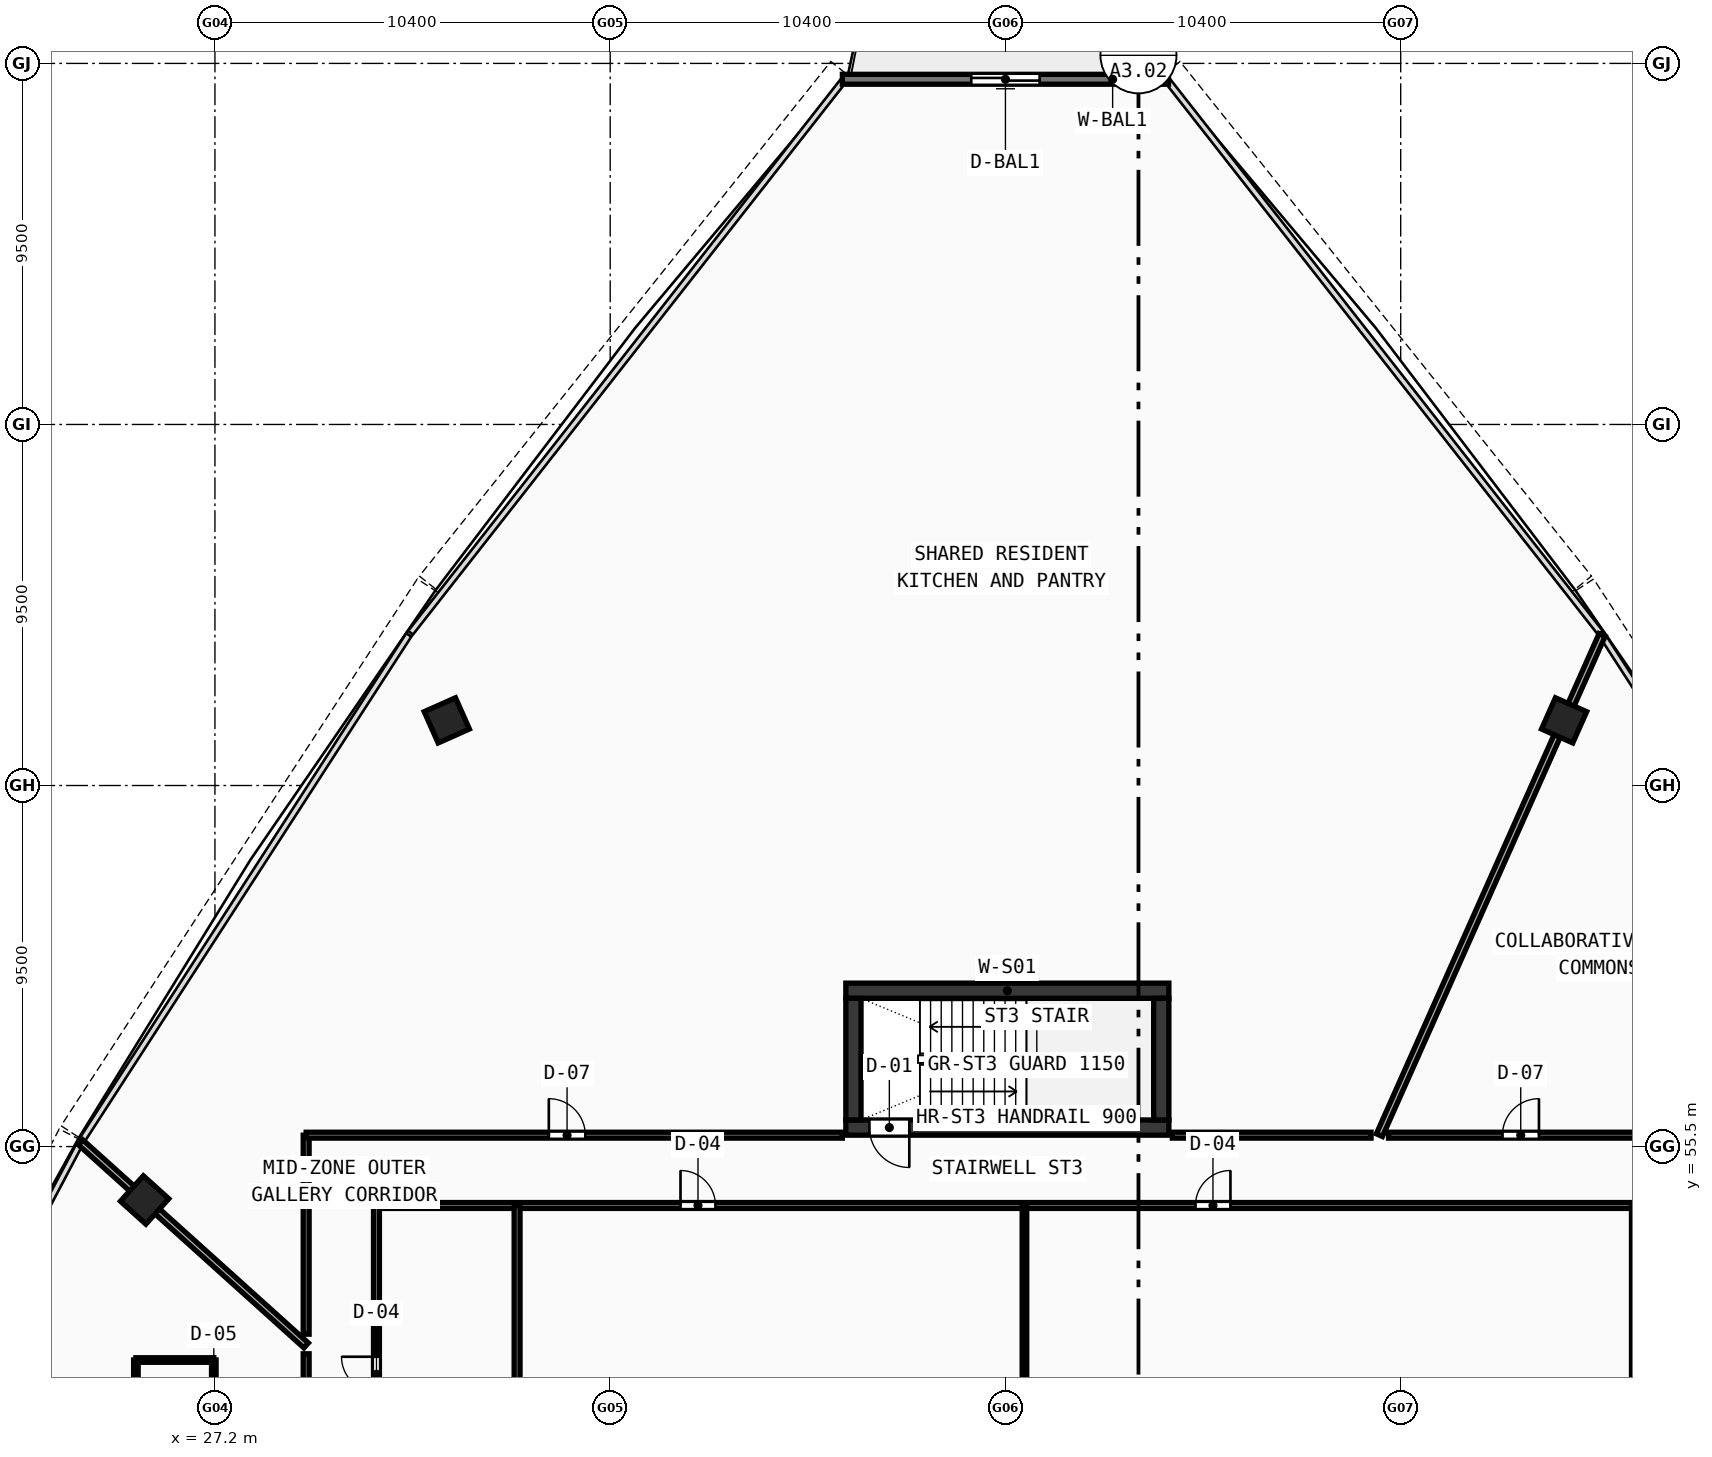
"""IFC4 building model, lengths in metres.
Left out: names, types, materials, properties, quantities, classifications, styles, units other than length and angle.
Written with IfcOpenShell. Run it as: python <this file> out.ifc"""

import sys

from ifc_helpers import new_model, si_unit, direction, frame, frame_2d, origin, origin_with_axes, origin_2d, place, context, subcontext, project, spatial, rectangle, hollow_rectangle, extrude, source, transform, mapped, element, fill, save


model = new_model("IFC4")
c1 = context("Model", 3, precision=1e-05, world=origin(), true_north=direction((0.0, 1.0)))
c2 = subcontext(c1, "Body", "Model", "MODEL_VIEW")
j1 = project(units=[si_unit("LENGTHUNIT", "METRE"), si_unit("PLANEANGLEUNIT", "RADIAN")], contexts=[c1])
p1 = place(None, origin())
s1 = spatial("IfcSite", under=j1, at=p1, CompositionType="ELEMENT")
p2 = place(p1, origin())
s2 = spatial("IfcBuilding", under=s1, at=p2, CompositionType="ELEMENT")
p3 = place(p2, frame((0.0, 0.0, 188.56)))
s3 = spatial("IfcBuildingStorey", under=s2, at=p3, CompositionType="ELEMENT", Elevation=188.56)
p4 = place(p3, frame((43.8, 59.6, 0.0), z_axis=(0.0, 0.0, 1.0), x_axis=(1.0, 0.0, 0.0)))
e1 = element("IfcWall", 1, at=p4, inside=s3, PredefinedType="SHEAR", context=c2, shape_type="SweptSolid", body=[
    extrude(rectangle(XDim=8.5, YDim=0.4, at=frame_2d((4.25, 0.0))), origin(), (0.0, 0.0, 1.0), 3.54),
])
p5 = place(p3, frame((43.8, 56.0, 0.0), z_axis=(0.0, 0.0, 1.0), x_axis=(1.0, 0.0, 0.0)))
e2 = element("IfcWall", 2, at=p5, inside=s3, PredefinedType="SHEAR", context=c2, shape_type="SweptSolid", body=[
    extrude(rectangle(XDim=8.5, YDim=0.4, at=frame_2d((4.25, 0.0))), origin(), (0.0, 0.0, 1.0), 3.54),
])
p6 = place(p5, frame((0.62, 0.0, 0.0)))
e3 = element("IfcOpeningElement", 3, at=p6, cuts=e2, PredefinedType="OPENING", context=c2, shape_type="SweptSolid", body=[
    extrude(rectangle(XDim=1.05, YDim=2.1, at=frame_2d((0.525, 1.05))), frame((0.0, 0.21, 0.0), z_axis=(0.0, -1.0, 0.0), x_axis=(1.0, 0.0, 0.0)), (0.0, 0.0, 1.0), 0.42),
])
for number, where, z_axis, x_axis in (
    (4, (44.0, 56.2, 0.0), (0.0, 0.0, 1.0), (0.0, 1.0, 0.0)),
    (5, (52.1, 56.2, 0.0), (0.0, 0.0, 1.0), (0.0, 1.0, 0.0)),
):
    element("IfcWall", number, at=place(p3, frame(where, z_axis=z_axis, x_axis=x_axis)), inside=s3, PredefinedType="SHEAR", context=c2, shape_type="SweptSolid", body=[
        extrude(rectangle(XDim=3.2, YDim=0.4, at=frame_2d((1.6, 0.0))), origin(), (0.0, 0.0, 1.0), 3.54),
    ])
m1 = source(origin(), c2, "Body", "SweptSolid", [
    extrude(hollow_rectangle(XDim=0.9, YDim=0.9, WallThickness=0.036, at=origin_2d()), origin(), (0.0, 0.0, 1.0), 3.8),
])
for number, where, z_axis, x_axis in (
    (6, (62.699, 66.715, -0.26), (0.0, 0.0, 1.0), (-0.914, 0.407, 0.0)),
    (7, (33.301, 66.715, -0.26), (0.0, 0.0, 1.0), (-0.914, -0.407, 0.0)),
    (8, (25.349, 54.095, -0.26), (0.0, 0.0, 1.0), (-0.669, -0.743, 0.0)),
):
    element("IfcColumn", number, at=place(p3, frame(where, z_axis=z_axis, x_axis=x_axis)), inside=s3, PredefinedType="COLUMN", context=c2, shape_type="MappedRepresentation", body=[
        mapped(m1, transform((0.0, 0.0, 0.0), scale=1.0)),
    ])
p7 = place(p3, frame((52.29, 83.583, 0.0), z_axis=(0.0, 0.0, 1.0), x_axis=(-1.0, 0.0, 0.0)))
e9 = element("IfcWall", 9, at=p7, inside=s3, PredefinedType="STANDARD", context=c2, shape_type="SweptSolid", body=[
    extrude(rectangle(XDim=8.581, YDim=0.26, at=frame_2d((4.29, 0.0))), origin(), (0.0, 0.0, 1.0), 3.54),
])
p8 = place(p7, frame((3.39, 0.0, 0.0)))
e10 = element("IfcOpeningElement", 10, at=p8, cuts=e9, PredefinedType="OPENING", context=c2, shape_type="SweptSolid", body=[
    extrude(rectangle(XDim=1.8, YDim=2.15, at=frame_2d((0.9, 1.075))), frame((0.0, 0.14, 0.0), z_axis=(0.0, -1.0, 0.0), x_axis=(1.0, 0.0, 0.0)), (0.0, 0.0, 1.0), 0.28),
])
p9 = place(p3, frame((31.45, 53.95, 0.0), z_axis=(0.0, 0.0, 1.0), x_axis=(1.0, 0.0, 0.0)))
e11 = element("IfcWall", 11, at=p9, inside=s3, PredefinedType="PARTITIONING", context=c2, shape_type="SweptSolid", body=[
    extrude(rectangle(XDim=33.1, YDim=0.155, at=frame_2d((16.55, 0.0))), origin(), (0.0, 0.0, 1.0), 2.89),
])
p10 = place(p9, frame((8.0, 0.0, 0.0)))
e12 = element("IfcOpeningElement", 12, at=p10, cuts=e11, PredefinedType="OPENING", context=c2, shape_type="SweptSolid", body=[
    extrude(rectangle(XDim=0.92, YDim=2.1, at=frame_2d((0.46, 1.05))), frame((0.0, 0.087, 0.0), z_axis=(0.0, -1.0, 0.0), x_axis=(1.0, 0.0, 0.0)), (0.0, 0.0, 1.0), 0.175),
])
p11 = place(p9, frame((21.55, 0.0, 0.0)))
e13 = element("IfcOpeningElement", 13, at=p11, cuts=e11, PredefinedType="OPENING", context=c2, shape_type="SweptSolid", body=[
    extrude(rectangle(XDim=0.92, YDim=2.1, at=frame_2d((0.46, 1.05))), frame((0.0, 0.087, 0.0), z_axis=(0.0, -1.0, 0.0), x_axis=(1.0, 0.0, 0.0)), (0.0, 0.0, 1.0), 0.175),
])
p12 = place(p3, frame((31.45, 42.25, 0.0), z_axis=(0.0, 0.0, 1.0), x_axis=(0.0, 1.0, 0.0)))
e14 = element("IfcWall", 14, at=p12, inside=s3, PredefinedType="PARTITIONING", context=c2, shape_type="SweptSolid", body=[
    extrude(rectangle(XDim=11.7, YDim=0.155, at=frame_2d((5.85, 0.0))), origin(), (0.0, 0.0, 1.0), 2.89),
])
p13 = place(p12, frame((1.4, 0.0, 0.0)))
e15 = element("IfcOpeningElement", 15, at=p13, cuts=e14, PredefinedType="OPENING", context=c2, shape_type="SweptSolid", body=[
    extrude(rectangle(XDim=0.94, YDim=2.1, at=frame_2d((0.47, 1.05))), frame((0.0, 0.087, 0.0), z_axis=(0.0, -1.0, 0.0), x_axis=(1.0, 0.0, 0.0)), (0.0, 0.0, 1.0), 0.175),
])
p14 = place(p12, frame((6.8, 0.0, 0.0)))
e16 = element("IfcOpeningElement", 16, at=p14, cuts=e14, PredefinedType="OPENING", context=c2, shape_type="SweptSolid", body=[
    extrude(rectangle(XDim=0.92, YDim=2.1, at=frame_2d((0.46, 1.05))), frame((0.0, 0.087, 0.0), z_axis=(0.0, -1.0, 0.0), x_axis=(1.0, 0.0, 0.0)), (0.0, 0.0, 1.0), 0.175),
])
for number, where, z_axis, x_axis in (
    (17, (64.55, 42.25, 0.0), (0.0, 0.0, 1.0), (0.0, 1.0, 0.0)),
    (18, (35.15, 42.25, 0.0), (0.0, 0.0, 1.0), (0.0, 1.0, 0.0)),
):
    element("IfcWall", number, at=place(p3, frame(where, z_axis=z_axis, x_axis=x_axis)), inside=s3, PredefinedType="PARTITIONING", context=c2, shape_type="SweptSolid", body=[
        extrude(rectangle(XDim=11.7, YDim=0.155, at=frame_2d((5.85, 0.0))), origin(), (0.0, 0.0, 1.0), 2.89),
    ])
p15 = place(p3, frame((48.5, 42.25, 0.0), z_axis=(0.0, 0.0, 1.0), x_axis=(0.0, 1.0, 0.0)))
e19 = element("IfcWall", 19, at=p15, inside=s3, PredefinedType="PARTITIONING", context=c2, shape_type="SweptSolid", body=[
    extrude(rectangle(XDim=11.7, YDim=0.12, at=frame_2d((5.85, 0.0))), origin(), (0.0, 0.0, 1.0), 3.14),
])
p16 = place(p3, frame((57.84, 55.8, 0.0), z_axis=(0.0, 0.0, 1.0), x_axis=(0.40674529891, 0.913541603768, 0.0)))
e20 = element("IfcWall", 20, at=p16, inside=s3, PredefinedType="PARTITIONING", context=c2, shape_type="SweptSolid", body=[
    extrude(rectangle(XDim=14.407, YDim=0.175, at=frame_2d((7.203, 0.0))), origin(), (0.0, 0.0, 1.0), 2.89),
])
p17 = place(p3, frame((29.6, 50.267, 0.0), z_axis=(0.0, 0.0, 1.0), x_axis=(-0.743139097079, 0.669136968335, 0.0)))
e21 = element("IfcWall", 21, at=p17, inside=s3, PredefinedType="PARTITIONING", context=c2, shape_type="SweptSolid", body=[
    extrude(rectangle(XDim=7.987, YDim=0.175, at=frame_2d((3.994, 0.0))), origin(), (0.0, 0.0, 1.0), 2.89),
])
p18 = place(p3, frame((29.6, 43.733, 0.0), z_axis=(0.0, 0.0, 1.0), x_axis=(0.0, 1.0, 0.0)))
e22 = element("IfcWall", 22, at=p18, inside=s3, PredefinedType="PARTITIONING", context=c2, shape_type="SweptSolid", body=[
    extrude(rectangle(XDim=6.315, YDim=0.155, at=frame_2d((3.157, 0.0))), origin(), (0.0, 0.0, 1.0), 2.89),
])
p19 = place(p18, frame((2.668, 0.0, 0.0)))
e23 = element("IfcOpeningElement", 23, at=p19, cuts=e22, PredefinedType="OPENING", context=c2, shape_type="SweptSolid", body=[
    extrude(rectangle(XDim=0.96, YDim=2.12, at=frame_2d((0.48, 1.06))), frame((0.0, 0.087, 0.0), z_axis=(0.0, -1.0, 0.0), x_axis=(1.0, 0.0, 0.0)), (0.0, 0.0, 1.0), 0.175),
])
p20 = place(p3, frame((29.6, 50.563, 0.0), z_axis=(0.0, 0.0, 1.0), x_axis=(0.0, 1.0, 0.0)))
e24 = element("IfcWall", 24, at=p20, inside=s3, PredefinedType="PARTITIONING", context=c2, shape_type="SweptSolid", body=[
    extrude(rectangle(XDim=5.237, YDim=0.155, at=frame_2d((2.618, 0.0))), origin(), (0.0, 0.0, 1.0), 3.54),
])
p21 = place(p3, frame((29.6, 55.8, 0.0), z_axis=(0.0, 0.0, 1.0), x_axis=(1.0, 0.0, 0.0)))
e25 = element("IfcWall", 25, at=p21, inside=s3, PredefinedType="PARTITIONING", context=c2, shape_type="SweptSolid", body=[
    extrude(rectangle(XDim=14.109, YDim=0.155, at=frame_2d((7.054, 0.0))), origin(), (0.0, 0.0, 1.0), 2.89),
])
p22 = place(p21, frame((6.385, 0.0, 0.0)))
e26 = element("IfcOpeningElement", 26, at=p22, cuts=e25, PredefinedType="OPENING", context=c2, shape_type="SweptSolid", body=[
    extrude(rectangle(XDim=0.96, YDim=2.12, at=frame_2d((0.48, 1.06))), frame((0.0, 0.087, 0.0), z_axis=(0.0, -1.0, 0.0), x_axis=(1.0, 0.0, 0.0)), (0.0, 0.0, 1.0), 0.175),
])
p23 = place(p3, frame((52.391, 55.8, 0.0), z_axis=(0.0, 0.0, 1.0), x_axis=(1.0, 0.0, 0.0)))
e27 = element("IfcWall", 27, at=p23, inside=s3, PredefinedType="PARTITIONING", context=c2, shape_type="SweptSolid", body=[
    extrude(rectangle(XDim=5.229, YDim=0.155, at=frame_2d((2.614, 0.0))), origin(), (0.0, 0.0, 1.0), 2.89),
])
p24 = place(p3, frame((58.08, 55.8, 0.0), z_axis=(0.0, 0.0, 1.0), x_axis=(1.0, 0.0, 0.0)))
e28 = element("IfcWall", 28, at=p24, inside=s3, PredefinedType="PARTITIONING", context=c2, shape_type="SweptSolid", body=[
    extrude(rectangle(XDim=6.966, YDim=0.155, at=frame_2d((3.483, 0.0))), origin(), (0.0, 0.0, 1.0), 3.14),
])
p25 = place(p24, frame((2.998, 0.0, 0.0)))
e29 = element("IfcOpeningElement", 29, at=p25, cuts=e28, PredefinedType="OPENING", context=c2, shape_type="SweptSolid", body=[
    extrude(rectangle(XDim=0.96, YDim=2.12, at=frame_2d((0.48, 1.06))), frame((0.0, 0.087, 0.0), z_axis=(0.0, -1.0, 0.0), x_axis=(1.0, 0.0, 0.0)), (0.0, 0.0, 1.0), 0.175),
])
p26 = place(p3, frame((27.17, 47.984, 0.0), z_axis=(0.0, 0.0, 1.0), x_axis=(0.0, 1.0, 0.0)))
e30 = element("IfcWall", 30, at=p26, inside=s3, PredefinedType="PARTITIONING", context=c2, shape_type="SweptSolid", body=[
    extrude(rectangle(XDim=1.9, YDim=0.12, at=frame_2d((0.95, 0.0))), origin(), (0.0, 0.0, 1.0), 3.54),
])
p27 = place(p26, frame((0.525, 0.0, 0.0)))
e31 = element("IfcOpeningElement", 31, at=p27, cuts=e30, PredefinedType="OPENING", context=c2, shape_type="SweptSolid", body=[
    extrude(rectangle(XDim=0.85, YDim=2.1, at=frame_2d((0.425, 1.05))), frame((0.0, 0.07, 0.0), z_axis=(0.0, -1.0, 0.0), x_axis=(1.0, 0.0, 0.0)), (0.0, 0.0, 1.0), 0.14),
])
p28 = place(p3, frame((27.17, 49.884, 0.0), z_axis=(0.0, 0.0, 1.0), x_axis=(-1.0, 0.0, 0.0)))
e32 = element("IfcWall", 32, at=p28, inside=s3, PredefinedType="PARTITIONING", context=c2, shape_type="SweptSolid", body=[
    extrude(rectangle(XDim=2.05, YDim=0.12, at=frame_2d((1.025, 0.0))), origin(), (0.0, 0.0, 1.0), 3.54),
])
p29 = place(p3, frame((25.12, 49.884, 0.0), z_axis=(0.0, 0.0, 1.0), x_axis=(0.0, -1.0, 0.0)))
e33 = element("IfcWall", 33, at=p29, inside=s3, PredefinedType="PARTITIONING", context=c2, shape_type="SweptSolid", body=[
    extrude(rectangle(XDim=1.9, YDim=0.12, at=frame_2d((0.95, 0.0))), origin(), (0.0, 0.0, 1.0), 3.54),
])
m2 = source(origin(), c2, "Body", "SweptSolid", [
    extrude(rectangle(XDim=1.8, YDim=2.15, at=frame_2d((0.9, 1.075))), frame((0.0, 0.025, 0.0), z_axis=(0.0, -1.0, 0.0), x_axis=(1.0, 0.0, 0.0)), (0.0, 0.0, 1.0), 0.05),
])
p30 = place(p8, origin_with_axes())
e34 = element("IfcDoor", 34, at=p30, inside=s3, OperationType="DOUBLE_DOOR_SLIDING", PredefinedType="DOOR", context=c2, shape_type="MappedRepresentation", body=[
    mapped(m2, transform((0.0, 0.0, 0.0), scale=1.0)),
])
fill(e10, e34)
m3 = source(origin(), c2, "Body", "SweptSolid", [
    extrude(rectangle(XDim=1.05, YDim=2.1, at=frame_2d((0.525, 1.05))), frame((0.0, 0.025, 0.0), z_axis=(0.0, -1.0, 0.0), x_axis=(1.0, 0.0, 0.0)), (0.0, 0.0, 1.0), 0.05),
])
p31 = place(p6, frame((1.05, 0.0, 0.0), z_axis=(0.0, 0.0, 1.0), x_axis=(-1.0, 0.0, 0.0)))
e35 = element("IfcDoor", 35, at=p31, inside=s3, OperationType="SINGLE_SWING_LEFT", PredefinedType="DOOR", context=c2, shape_type="MappedRepresentation", body=[
    mapped(m3, transform((0.0, 0.0, 0.0), scale=1.0)),
])
fill(e3, e35)
m4 = source(origin(), c2, "Body", "SweptSolid", [
    extrude(rectangle(XDim=0.92, YDim=2.1, at=frame_2d((0.46, 1.05))), frame((0.0, 0.025, 0.0), z_axis=(0.0, -1.0, 0.0), x_axis=(1.0, 0.0, 0.0)), (0.0, 0.0, 1.0), 0.05),
])
p32 = place(p14, origin_with_axes())
e36 = element("IfcDoor", 36, at=p32, inside=s3, OperationType="SINGLE_SWING_RIGHT", PredefinedType="DOOR", context=c2, shape_type="MappedRepresentation", body=[
    mapped(m4, transform((0.0, 0.0, 0.0), scale=1.0)),
])
fill(e16, e36)
p33 = place(p10, origin_with_axes())
e37 = element("IfcDoor", 37, at=p33, inside=s3, OperationType="SINGLE_SWING_LEFT", PredefinedType="DOOR", context=c2, shape_type="MappedRepresentation", body=[
    mapped(m4, transform((0.0, 0.0, 0.0), scale=1.0)),
])
fill(e12, e37)
p34 = place(p11, origin_with_axes())
e38 = element("IfcDoor", 38, at=p34, inside=s3, OperationType="SINGLE_SWING_RIGHT", PredefinedType="DOOR", context=c2, shape_type="MappedRepresentation", body=[
    mapped(m4, transform((0.0, 0.0, 0.0), scale=1.0)),
])
fill(e13, e38)
m5 = source(origin(), c2, "Body", "SweptSolid", [
    extrude(rectangle(XDim=0.96, YDim=2.12, at=frame_2d((0.48, 1.06))), frame((0.0, 0.025, 0.0), z_axis=(0.0, -1.0, 0.0), x_axis=(1.0, 0.0, 0.0)), (0.0, 0.0, 1.0), 0.05),
])
p35 = place(p25, origin_with_axes())
e39 = element("IfcDoor", 39, at=p35, inside=s3, OperationType="SINGLE_SWING_RIGHT", PredefinedType="DOOR", context=c2, shape_type="MappedRepresentation", body=[
    mapped(m5, transform((0.0, 0.0, 0.0), scale=1.0)),
])
fill(e29, e39)
p36 = place(p22, origin_with_axes())
e40 = element("IfcDoor", 40, at=p36, inside=s3, OperationType="SINGLE_SWING_LEFT", PredefinedType="DOOR", context=c2, shape_type="MappedRepresentation", body=[
    mapped(m5, transform((0.0, 0.0, 0.0), scale=1.0)),
])
fill(e26, e40)
save(model, sys.argv[1])
